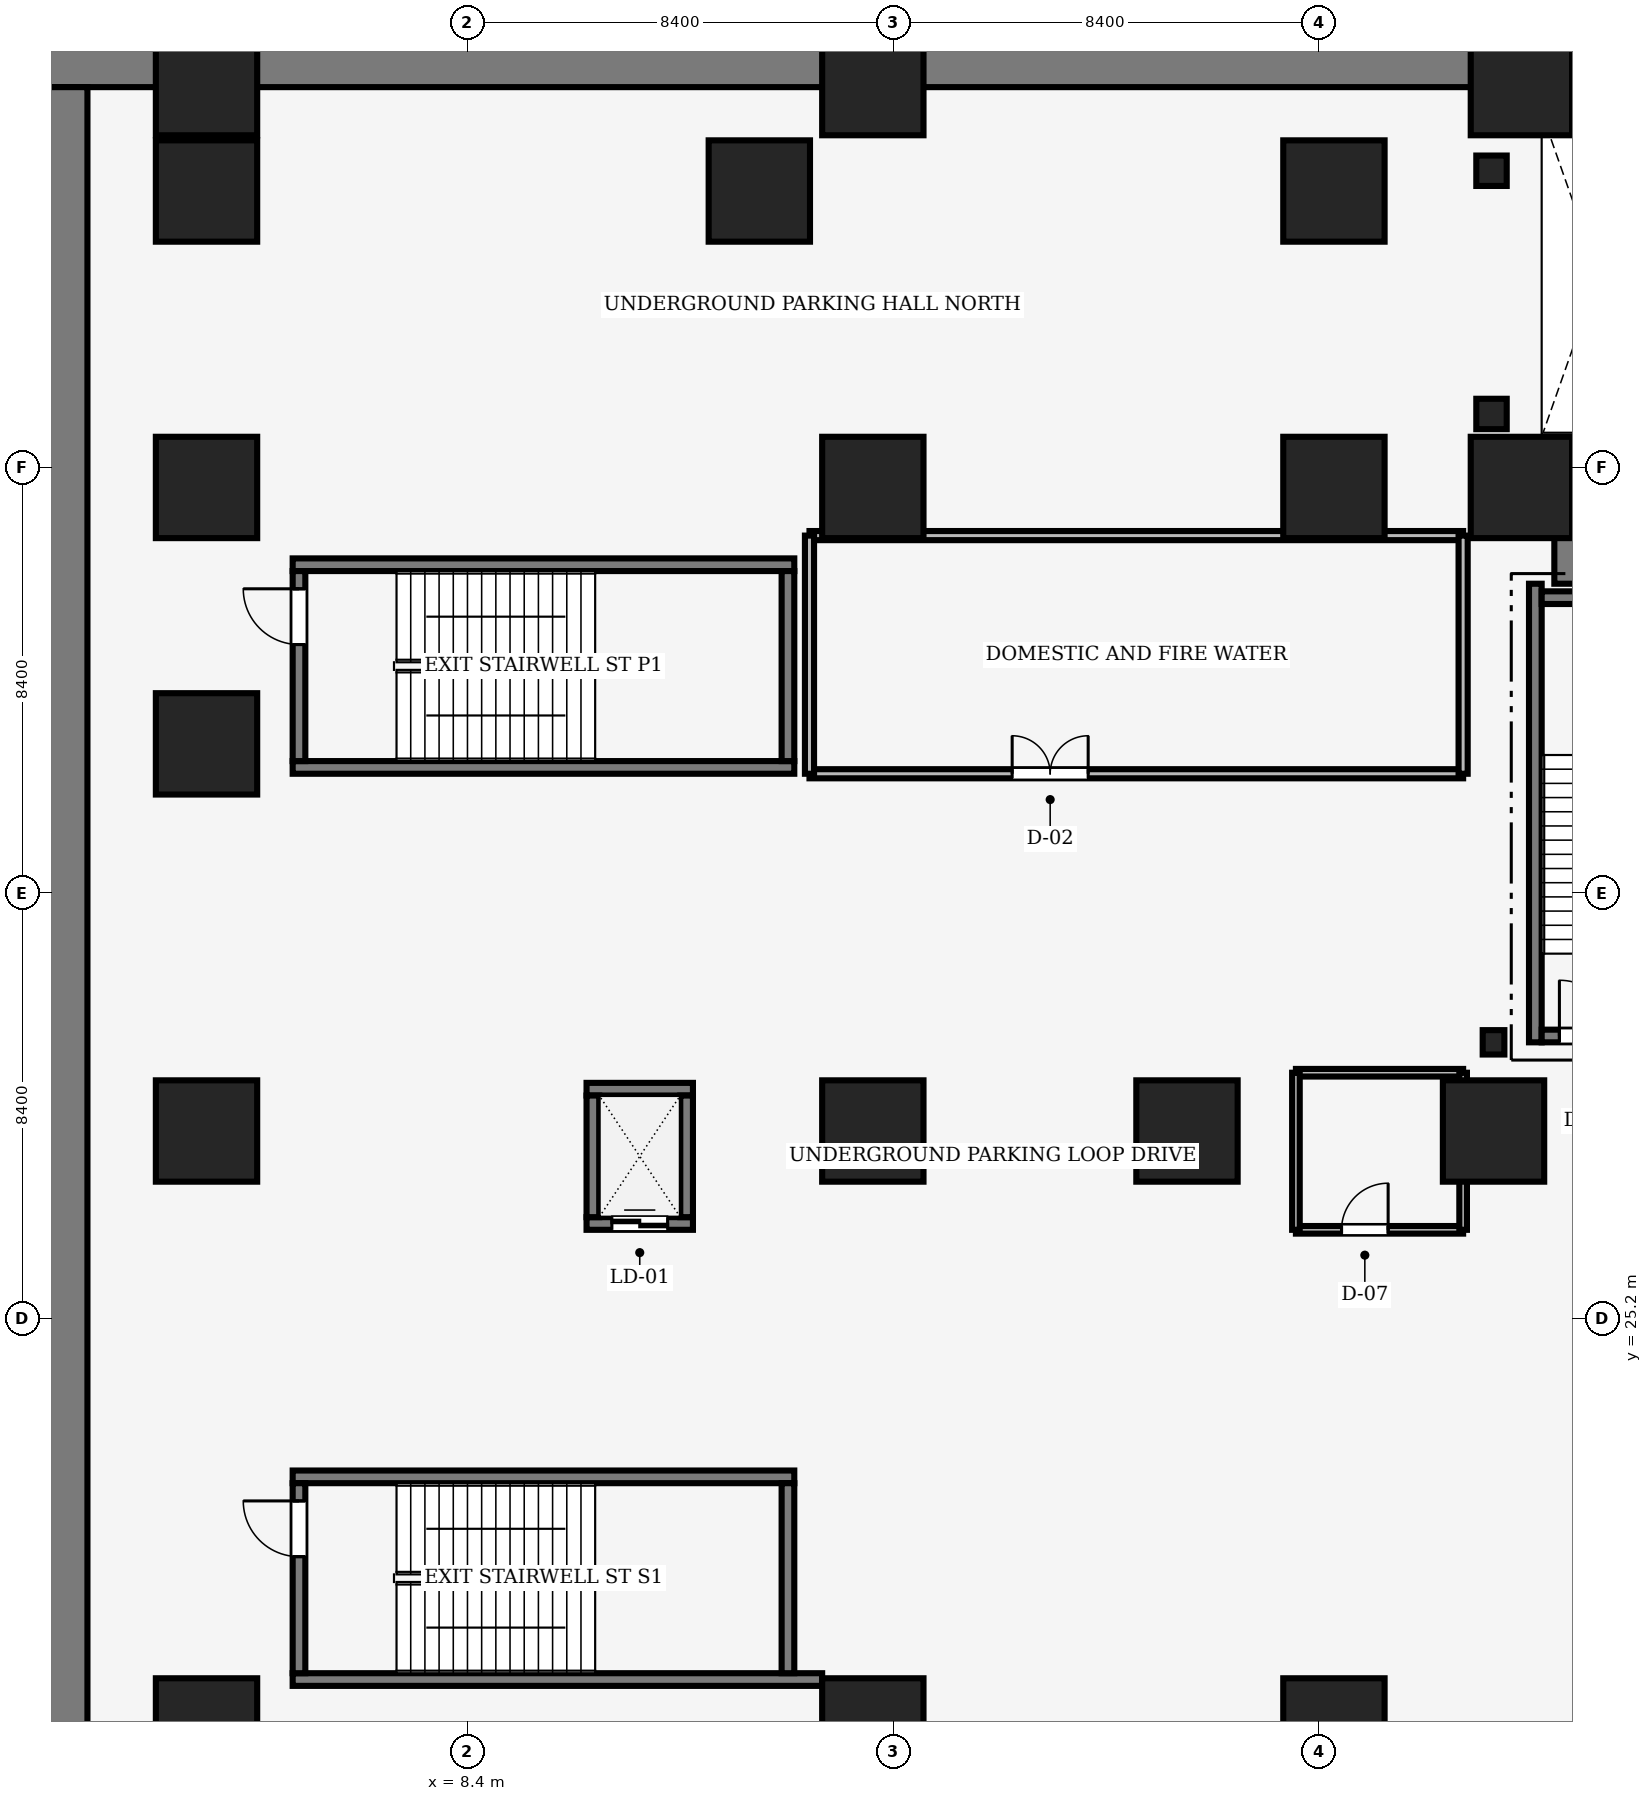
"""IFC4 building model, lengths in metres.
Left out: names, types, materials, properties, quantities, classifications, styles, units other than length and angle.
Written with IfcOpenShell. Run it as: python <this file> out.ifc"""

import sys

from ifc_helpers import new_model, si_unit, direction, frame, frame_2d, origin, origin_2d, place, context, subcontext, project, spatial, rectangle, i_section, extrude, source, transform, mapped, element, fill, save


model = new_model("IFC4")
c1 = context("Model", 3, precision=1e-05, world=origin(), true_north=direction((0.0, 1.0)))
c2 = subcontext(c1, "Body", "Model", "MODEL_VIEW")
j1 = project(units=[si_unit("LENGTHUNIT", "METRE"), si_unit("PLANEANGLEUNIT", "RADIAN")], contexts=[c1])
p1 = place(None, origin())
s1 = spatial("IfcSite", under=j1, at=p1, CompositionType="ELEMENT")
p2 = place(p1, origin())
s2 = spatial("IfcBuilding", under=s1, at=p2, CompositionType="ELEMENT")
p3 = place(p2, frame((0.0, 0.0, -11.4)))
s3 = spatial("IfcBuildingStorey", under=s2, at=p3, CompositionType="ELEMENT", Elevation=-11.4)
m1 = source(origin(), c2, "Body", "SweptSolid", [
    extrude(rectangle(XDim=17.52, YDim=1.2, at=frame_2d((8.76, 0.0))), origin(), (0.0, 0.0, 1.0), 5.04),
])
p4 = place(p3, frame((29.85, 40.3, 0.0), z_axis=(0.0, 0.0, 1.0), x_axis=(1.0, 0.0, 0.0)))
e1 = element("IfcWall", 1, at=p4, inside=s3, PredefinedType="SHEAR", context=c2, shape_type="MappedRepresentation", body=[
    mapped(m1, transform((0.0, 0.0, 0.0), scale=1.0)),
])
m2 = source(origin(), c2, "Body", "SweptSolid", [
    extrude(rectangle(XDim=76.8, YDim=0.9, at=frame_2d((38.4, 0.0))), origin(), (0.0, 0.0, 1.0), 5.04),
])
p5 = place(p3, frame((0.0, 49.95, 0.0), z_axis=(0.0, 0.0, 1.0), x_axis=(1.0, 0.0, 0.0)))
e2 = element("IfcWall", 2, at=p5, inside=s3, PredefinedType="SOLIDWALL", context=c2, shape_type="MappedRepresentation", body=[
    mapped(m2, transform((0.0, 0.0, 0.0), scale=1.0)),
])
m3 = source(origin(), c2, "Body", "SweptSolid", [
    extrude(rectangle(XDim=48.6, YDim=0.9, at=frame_2d((24.3, 0.0))), origin(), (0.0, 0.0, 1.0), 5.04),
])
p6 = place(p3, frame((0.45, 0.9, 0.0), z_axis=(0.0, 0.0, 1.0), x_axis=(0.0, 1.0, 0.0)))
e3 = element("IfcWall", 3, at=p6, inside=s3, PredefinedType="SOLIDWALL", context=c2, shape_type="MappedRepresentation", body=[
    mapped(m3, transform((0.0, 0.0, 0.0), scale=1.0)),
])
m4 = source(origin(), c2, "Body", "SweptSolid", [
    extrude(i_section(OverallWidth=0.428, OverallDepth=0.481, WebThickness=0.04, FlangeThickness=0.063, FilletRadius=0.015, at=origin_2d()), origin(), (0.0, 0.0, 1.0), 5.04),
])
p7 = place(p3, frame((28.65, 30.65, 0.0), z_axis=(0.0, 0.0, 1.0), x_axis=(1.0, 0.0, 0.0)))
e4 = element("IfcColumn", 4, at=p7, inside=s3, PredefinedType="COLUMN", context=c2, shape_type="MappedRepresentation", body=[
    mapped(m4, transform((0.0, 0.0, 0.0), scale=1.0)),
])
m5 = source(origin(), c2, "Body", "SweptSolid", [
    extrude(rectangle(XDim=2.0, YDim=2.0, at=origin_2d()), origin(), (0.0, 0.0, 1.0), 5.04),
])
for number, where, z_axis, x_axis in (
    (5, (3.25, 17.1, 0.0), (0.0, 0.0, 1.0), (1.0, 0.0, 0.0)),
    (6, (16.4, 17.1, 0.0), (0.0, 0.0, 1.0), (1.0, 0.0, 0.0)),
    (7, (25.5, 17.1, 0.0), (0.0, 0.0, 1.0), (1.0, 0.0, 0.0)),
    (8, (3.25, 28.9, 0.0), (0.0, 0.0, 1.0), (1.0, 0.0, 0.0)),
    (9, (16.4, 28.9, 0.0), (0.0, 0.0, 1.0), (1.0, 0.0, 0.0)),
    (10, (22.6, 28.9, 0.0), (0.0, 0.0, 1.0), (1.0, 0.0, 0.0)),
    (11, (28.65, 28.9, 0.0), (0.0, 0.0, 1.0), (1.0, 0.0, 0.0)),
    (12, (3.25, 36.54, 0.0), (0.0, 0.0, 1.0), (1.0, 0.0, 0.0)),
    (13, (3.25, 41.6, 0.0), (0.0, 0.0, 1.0), (1.0, 0.0, 0.0)),
    (14, (3.25, 49.55, 0.0), (0.0, 0.0, 1.0), (1.0, 0.0, 0.0)),
    (15, (16.4, 41.6, 0.0), (0.0, 0.0, 1.0), (1.0, 0.0, 0.0)),
    (16, (25.5, 41.6, 0.0), (0.0, 0.0, 1.0), (1.0, 0.0, 0.0)),
    (17, (29.2, 41.6, 0.0), (0.0, 0.0, 1.0), (1.0, 0.0, 0.0)),
    (18, (3.25, 47.45, 0.0), (0.0, 0.0, 1.0), (1.0, 0.0, 0.0)),
    (19, (14.16, 47.45, 0.0), (0.0, 0.0, 1.0), (1.0, 0.0, 0.0)),
    (20, (25.5, 47.45, 0.0), (0.0, 0.0, 1.0), (1.0, 0.0, 0.0)),
    (21, (16.4, 49.55, 0.0), (0.0, 0.0, 1.0), (1.0, 0.0, 0.0)),
    (22, (29.2, 49.55, 0.0), (0.0, 0.0, 1.0), (1.0, 0.0, 0.0)),
):
    element("IfcColumn", number, at=place(p3, frame(where, z_axis=z_axis, x_axis=x_axis)), inside=s3, PredefinedType="COLUMN", context=c2, shape_type="MappedRepresentation", body=[
        mapped(m5, transform((0.0, 0.0, 0.0), scale=1.0)),
    ])
m6 = source(origin(), c2, "Body", "SweptSolid", [
    extrude(rectangle(XDim=0.6, YDim=0.6, at=origin_2d()), origin(), (0.0, 0.0, 1.0), 5.163),
])
for number, where, z_axis, x_axis in (
    (23, (28.61, 43.05, 0.0), (0.0, 0.0, 1.0), (1.0, 0.0, 0.0)),
    (24, (28.61, 47.85, 0.0), (0.0, 0.0, 1.0), (1.0, 0.0, 0.0)),
):
    element("IfcColumn", number, at=place(p3, frame(where, z_axis=z_axis, x_axis=x_axis)), inside=s3, PredefinedType="COLUMN", context=c2, shape_type="MappedRepresentation", body=[
        mapped(m6, transform((0.0, 0.0, 0.0), scale=1.0)),
    ])
m7 = source(origin(), c2, "Body", "SweptSolid", [
    extrude(rectangle(XDim=9.05, YDim=0.25, at=frame_2d((4.525, 0.0))), origin(), (0.0, 0.0, 1.0), 5.2),
])
p8 = place(p3, frame((29.475, 30.65, 0.0), z_axis=(0.0, 0.0, 1.0), x_axis=(0.0, 1.0, 0.0)))
e25 = element("IfcWall", 25, at=p8, inside=s3, PredefinedType="SOLIDWALL", context=c2, shape_type="MappedRepresentation", body=[
    mapped(m7, transform((0.0, 0.0, 0.0), scale=1.0)),
])
m8 = source(origin(), c2, "Body", "SweptSolid", [
    extrude(rectangle(XDim=3.15, YDim=0.25, at=frame_2d((1.575, 0.0))), origin(), (0.0, 0.0, 1.0), 5.2),
])
p9 = place(p3, frame((29.6, 39.425, 0.0), z_axis=(0.0, 0.0, 1.0), x_axis=(1.0, 0.0, 0.0)))
e26 = element("IfcWall", 26, at=p9, inside=s3, PredefinedType="SOLIDWALL", context=c2, shape_type="MappedRepresentation", body=[
    mapped(m8, transform((0.0, 0.0, 0.0), scale=1.0)),
])
p10 = place(p3, frame((29.6, 30.775, 0.0), z_axis=(0.0, 0.0, 1.0), x_axis=(1.0, 0.0, 0.0)))
e27 = element("IfcWall", 27, at=p10, inside=s3, PredefinedType="SOLIDWALL", context=c2, shape_type="MappedRepresentation", body=[
    mapped(m8, transform((0.0, 0.0, 0.0), scale=1.0)),
])
m9 = source(origin(), c2, "Body", "SweptSolid", [
    extrude(rectangle(XDim=1.1, YDim=2.2, at=frame_2d((0.55, 1.1))), frame((0.0, 0.135, 0.0), z_axis=(0.0, -1.0, 0.0), x_axis=(1.0, 0.0, 0.0)), (0.0, 0.0, 1.0), 0.27),
])
p11 = place(p10, frame((0.35, 0.0, 0.0)))
e28 = element("IfcOpeningElement", 28, at=p11, cuts=e27, PredefinedType="OPENING", context=c2, shape_type="MappedRepresentation", body=[
    mapped(m9, transform((0.0, 0.0, 0.0), scale=1.0)),
])
m10 = source(origin(), c2, "Body", "SweptSolid", [
    extrude(rectangle(XDim=10.45, YDim=0.25, at=frame_2d((5.225, 0.0))), origin(), (0.0, 0.0, 1.0), 5.2),
])
p12 = place(p3, frame((4.95, 18.075, 0.0), z_axis=(0.0, 0.0, 1.0), x_axis=(1.0, 0.0, 0.0)))
e29 = element("IfcWall", 29, at=p12, inside=s3, PredefinedType="SOLIDWALL", context=c2, shape_type="MappedRepresentation", body=[
    mapped(m10, transform((0.0, 0.0, 0.0), scale=1.0)),
])
m11 = source(origin(), c2, "Body", "SweptSolid", [
    extrude(rectangle(XDim=9.9, YDim=0.25, at=frame_2d((4.95, 0.0))), origin(), (0.0, 0.0, 1.0), 5.2),
])
p13 = place(p3, frame((4.95, 22.075, 0.0), z_axis=(0.0, 0.0, 1.0), x_axis=(1.0, 0.0, 0.0)))
e30 = element("IfcWall", 30, at=p13, inside=s3, PredefinedType="SOLIDWALL", context=c2, shape_type="MappedRepresentation", body=[
    mapped(m11, transform((0.0, 0.0, 0.0), scale=1.0)),
])
m12 = source(origin(), c2, "Body", "SweptSolid", [
    extrude(rectangle(XDim=3.75, YDim=0.25, at=frame_2d((1.875, 0.0))), origin(), (0.0, 0.0, 1.0), 5.2),
])
p14 = place(p3, frame((14.725, 18.2, 0.0), z_axis=(0.0, 0.0, 1.0), x_axis=(0.0, 1.0, 0.0)))
e31 = element("IfcWall", 31, at=p14, inside=s3, PredefinedType="SOLIDWALL", context=c2, shape_type="MappedRepresentation", body=[
    mapped(m12, transform((0.0, 0.0, 0.0), scale=1.0)),
])
p15 = place(p3, frame((5.075, 18.2, 0.0), z_axis=(0.0, 0.0, 1.0), x_axis=(0.0, 1.0, 0.0)))
e32 = element("IfcWall", 32, at=p15, inside=s3, PredefinedType="SOLIDWALL", context=c2, shape_type="MappedRepresentation", body=[
    mapped(m12, transform((0.0, 0.0, 0.0), scale=1.0)),
])
p16 = place(p15, frame((2.3, 0.0, 0.0)))
e33 = element("IfcOpeningElement", 33, at=p16, cuts=e32, PredefinedType="OPENING", context=c2, shape_type="MappedRepresentation", body=[
    mapped(m9, transform((0.0, 0.0, 0.0), scale=1.0)),
])
for number, where, z_axis, x_axis in (
    (34, (4.95, 36.075, 0.0), (0.0, 0.0, 1.0), (1.0, 0.0, 0.0)),
    (35, (4.95, 40.075, 0.0), (0.0, 0.0, 1.0), (1.0, 0.0, 0.0)),
):
    element("IfcWall", number, at=place(p3, frame(where, z_axis=z_axis, x_axis=x_axis)), inside=s3, PredefinedType="SOLIDWALL", context=c2, shape_type="MappedRepresentation", body=[
        mapped(m11, transform((0.0, 0.0, 0.0), scale=1.0)),
    ])
p17 = place(p3, frame((14.725, 36.2, 0.0), z_axis=(0.0, 0.0, 1.0), x_axis=(0.0, 1.0, 0.0)))
e36 = element("IfcWall", 36, at=p17, inside=s3, PredefinedType="SOLIDWALL", context=c2, shape_type="MappedRepresentation", body=[
    mapped(m12, transform((0.0, 0.0, 0.0), scale=1.0)),
])
p18 = place(p3, frame((5.075, 36.2, 0.0), z_axis=(0.0, 0.0, 1.0), x_axis=(0.0, 1.0, 0.0)))
e37 = element("IfcWall", 37, at=p18, inside=s3, PredefinedType="SOLIDWALL", context=c2, shape_type="MappedRepresentation", body=[
    mapped(m12, transform((0.0, 0.0, 0.0), scale=1.0)),
])
p19 = place(p18, frame((2.3, 0.0, 0.0)))
e38 = element("IfcOpeningElement", 38, at=p19, cuts=e37, PredefinedType="OPENING", context=c2, shape_type="MappedRepresentation", body=[
    mapped(m9, transform((0.0, 0.0, 0.0), scale=1.0)),
])
m13 = source(origin(), c2, "Body", "SweptSolid", [
    extrude(rectangle(XDim=2.1, YDim=0.25, at=frame_2d((1.05, 0.0))), origin(), (0.0, 0.0, 1.0), 5.04),
])
p20 = place(p3, frame((10.75, 27.075, 0.0), z_axis=(0.0, 0.0, 1.0), x_axis=(1.0, 0.0, 0.0)))
e39 = element("IfcWall", 39, at=p20, inside=s3, PredefinedType="SOLIDWALL", context=c2, shape_type="MappedRepresentation", body=[
    mapped(m13, transform((0.0, 0.0, 0.0), scale=1.0)),
])
p21 = place(p20, frame((0.5, 0.0, 0.0)))
e40 = element("IfcOpeningElement", 40, at=p21, cuts=e39, PredefinedType="OPENING", context=c2, shape_type="MappedRepresentation", body=[
    mapped(m9, transform((0.0, 0.0, 0.0), scale=1.0)),
])
p22 = place(p3, frame((10.75, 29.725, 0.0), z_axis=(0.0, 0.0, 1.0), x_axis=(1.0, 0.0, 0.0)))
e41 = element("IfcWall", 41, at=p22, inside=s3, PredefinedType="SOLIDWALL", context=c2, shape_type="MappedRepresentation", body=[
    mapped(m13, transform((0.0, 0.0, 0.0), scale=1.0)),
])
m14 = source(origin(), c2, "Body", "SweptSolid", [
    extrude(rectangle(XDim=2.4, YDim=0.25, at=frame_2d((1.2, 0.0))), origin(), (0.0, 0.0, 1.0), 5.04),
])
for number, where, z_axis, x_axis in (
    (42, (10.875, 27.2, 0.0), (0.0, 0.0, 1.0), (0.0, 1.0, 0.0)),
    (43, (12.725, 27.2, 0.0), (0.0, 0.0, 1.0), (0.0, 1.0, 0.0)),
):
    element("IfcWall", number, at=place(p3, frame(where, z_axis=z_axis, x_axis=x_axis)), inside=s3, PredefinedType="SOLIDWALL", context=c2, shape_type="MappedRepresentation", body=[
        mapped(m14, transform((0.0, 0.0, 0.0), scale=1.0)),
    ])
m15 = source(origin(), c2, "Body", "SweptSolid", [
    extrude(rectangle(XDim=12.9, YDim=0.18, at=frame_2d((6.45, 0.0))), origin(), (0.0, 0.0, 1.0), 4.432),
])
p23 = place(p3, frame((15.15, 35.95, 0.0), z_axis=(0.0, 0.0, 1.0), x_axis=(1.0, 0.0, 0.0)))
e44 = element("IfcWall", 44, at=p23, inside=s3, PredefinedType="PARTITIONING", context=c2, shape_type="MappedRepresentation", body=[
    mapped(m15, transform((0.0, 0.0, 0.0), scale=1.0)),
])
m16 = source(origin(), c2, "Body", "SweptSolid", [
    extrude(rectangle(XDim=1.5, YDim=2.3, at=frame_2d((0.75, 1.15))), frame((0.0, 0.1, 0.0), z_axis=(0.0, -1.0, 0.0), x_axis=(1.0, 0.0, 0.0)), (0.0, 0.0, 1.0), 0.2),
])
p24 = place(p23, frame((4.0, 0.0, 0.0)))
e45 = element("IfcOpeningElement", 45, at=p24, cuts=e44, PredefinedType="OPENING", context=c2, shape_type="MappedRepresentation", body=[
    mapped(m16, transform((0.0, 0.0, 0.0), scale=1.0)),
])
m17 = source(origin(), c2, "Body", "SweptSolid", [
    extrude(rectangle(XDim=3.3, YDim=0.15, at=frame_2d((1.65, 0.0))), origin(), (0.0, 0.0, 1.0), 5.04),
])
p25 = place(p3, frame((24.75, 26.95, 0.0), z_axis=(0.0, 0.0, 1.0), x_axis=(1.0, 0.0, 0.0)))
e46 = element("IfcWall", 46, at=p25, inside=s3, PredefinedType="PARTITIONING", context=c2, shape_type="MappedRepresentation", body=[
    mapped(m17, transform((0.0, 0.0, 0.0), scale=1.0)),
])
m18 = source(origin(), c2, "Body", "SweptSolid", [
    extrude(rectangle(XDim=0.92, YDim=2.1, at=frame_2d((0.46, 1.05))), frame((0.0, 0.085, 0.0), z_axis=(0.0, -1.0, 0.0), x_axis=(1.0, 0.0, 0.0)), (0.0, 0.0, 1.0), 0.17),
])
p26 = place(p25, frame((0.9, 0.0, 0.0)))
e47 = element("IfcOpeningElement", 47, at=p26, cuts=e46, PredefinedType="OPENING", context=c2, shape_type="MappedRepresentation", body=[
    mapped(m18, transform((0.0, 0.0, 0.0), scale=1.0)),
])
p27 = place(p3, frame((15.15, 40.65, 0.0), z_axis=(0.0, 0.0, 1.0), x_axis=(1.0, 0.0, 0.0)))
e48 = element("IfcWall", 48, at=p27, inside=s3, PredefinedType="PARTITIONING", context=c2, shape_type="MappedRepresentation", body=[
    mapped(m15, transform((0.0, 0.0, 0.0), scale=1.0)),
])
m19 = source(origin(), c2, "Body", "SweptSolid", [
    extrude(rectangle(XDim=4.7, YDim=0.18, at=frame_2d((2.35, 0.0))), origin(), (0.0, 0.0, 1.0), 5.04),
])
for number, where, z_axis, x_axis in (
    (49, (15.15, 35.95, 0.0), (0.0, 0.0, 1.0), (0.0, 1.0, 0.0)),
    (50, (28.05, 35.95, 0.0), (0.0, 0.0, 1.0), (0.0, 1.0, 0.0)),
):
    element("IfcWall", number, at=place(p3, frame(where, z_axis=z_axis, x_axis=x_axis)), inside=s3, PredefinedType="PARTITIONING", context=c2, shape_type="MappedRepresentation", body=[
        mapped(m19, transform((0.0, 0.0, 0.0), scale=1.0)),
    ])
p28 = place(p3, frame((24.75, 30.05, 0.0), z_axis=(0.0, 0.0, 1.0), x_axis=(1.0, 0.0, 0.0)))
e51 = element("IfcWall", 51, at=p28, inside=s3, PredefinedType="PARTITIONING", context=c2, shape_type="MappedRepresentation", body=[
    mapped(m17, transform((0.0, 0.0, 0.0), scale=1.0)),
])
m20 = source(origin(), c2, "Body", "SweptSolid", [
    extrude(rectangle(XDim=3.1, YDim=0.15, at=frame_2d((1.55, 0.0))), origin(), (0.0, 0.0, 1.0), 4.508),
])
for number, where, z_axis, x_axis in (
    (52, (24.75, 26.95, 0.0), (0.0, 0.0, 1.0), (0.0, 1.0, 0.0)),
    (53, (28.05, 26.95, 0.0), (0.0, 0.0, 1.0), (0.0, 1.0, 0.0)),
):
    element("IfcWall", number, at=place(p3, frame(where, z_axis=z_axis, x_axis=x_axis)), inside=s3, PredefinedType="PARTITIONING", context=c2, shape_type="MappedRepresentation", body=[
        mapped(m20, transform((0.0, 0.0, 0.0), scale=1.0)),
    ])
m21 = source(origin(), c2, "Body", "SweptSolid", [
    extrude(rectangle(XDim=1.1, YDim=2.2, at=frame_2d((0.55, 1.1))), frame((0.0, 0.025, 0.0), z_axis=(0.0, -1.0, 0.0), x_axis=(1.0, 0.0, 0.0)), (0.0, 0.0, 1.0), 0.05),
])
p29 = place(p11, origin())
e54 = element("IfcDoor", 54, at=p29, inside=s3, OperationType="SINGLE_SWING_LEFT", PredefinedType="DOOR", context=c2, shape_type="MappedRepresentation", body=[
    mapped(m21, transform((0.0, 0.0, 0.0), scale=1.0)),
])
fill(e28, e54)
p30 = place(p16, origin())
e55 = element("IfcDoor", 55, at=p30, inside=s3, OperationType="SINGLE_SWING_RIGHT", PredefinedType="DOOR", context=c2, shape_type="MappedRepresentation", body=[
    mapped(m21, transform((0.0, 0.0, 0.0), scale=1.0)),
])
fill(e33, e55)
p31 = place(p19, origin())
e56 = element("IfcDoor", 56, at=p31, inside=s3, OperationType="SINGLE_SWING_RIGHT", PredefinedType="DOOR", context=c2, shape_type="MappedRepresentation", body=[
    mapped(m21, transform((0.0, 0.0, 0.0), scale=1.0)),
])
fill(e38, e56)
p32 = place(p21, origin())
e57 = element("IfcDoor", 57, at=p32, inside=s3, OperationType="DOUBLE_DOOR_SLIDING", PredefinedType="DOOR", context=c2, shape_type="MappedRepresentation", body=[
    mapped(m21, transform((0.0, 0.0, 0.0), scale=1.0)),
])
fill(e40, e57)
m22 = source(origin(), c2, "Body", "SweptSolid", [
    extrude(rectangle(XDim=1.5, YDim=2.3, at=frame_2d((0.75, 1.15))), frame((0.0, 0.025, 0.0), z_axis=(0.0, -1.0, 0.0), x_axis=(1.0, 0.0, 0.0)), (0.0, 0.0, 1.0), 0.05),
])
p33 = place(p24, origin())
e58 = element("IfcDoor", 58, at=p33, inside=s3, OperationType="DOUBLE_DOOR_SINGLE_SWING", PredefinedType="DOOR", context=c2, shape_type="MappedRepresentation", body=[
    mapped(m22, transform((0.0, 0.0, 0.0), scale=1.0)),
])
fill(e45, e58)
m23 = source(origin(), c2, "Body", "SweptSolid", [
    extrude(rectangle(XDim=0.92, YDim=2.1, at=frame_2d((0.46, 1.05))), frame((0.0, 0.025, 0.0), z_axis=(0.0, -1.0, 0.0), x_axis=(1.0, 0.0, 0.0)), (0.0, 0.0, 1.0), 0.05),
])
p34 = place(p26, origin())
e59 = element("IfcDoor", 59, at=p34, inside=s3, OperationType="SINGLE_SWING_RIGHT", PredefinedType="DOOR", context=c2, shape_type="MappedRepresentation", body=[
    mapped(m23, transform((0.0, 0.0, 0.0), scale=1.0)),
])
fill(e47, e59)
save(model, sys.argv[1])
